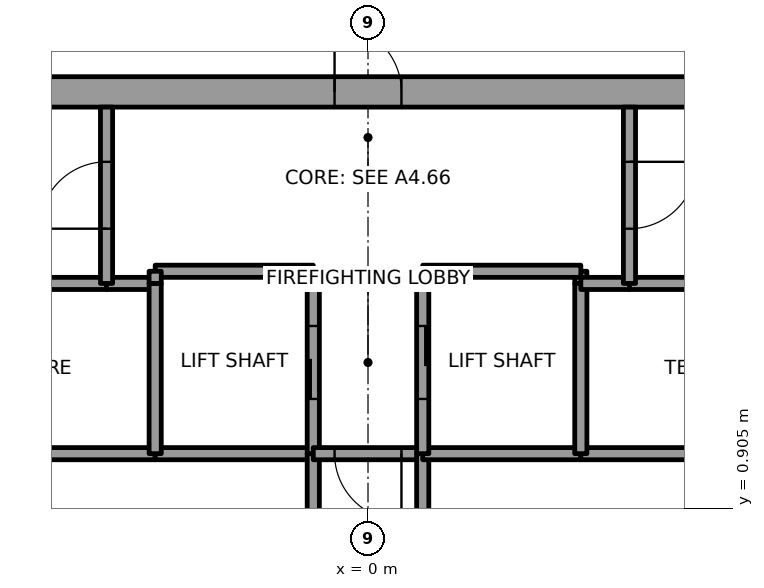
"""IFC4 building model, lengths in metres.
Left out: names, types, materials, properties, quantities, classifications, styles, units other than length and angle.
Written with IfcOpenShell. Run it as: python <this file> out.ifc"""

import sys

from ifc_helpers import new_model, si_unit, direction, frame, frame_2d, origin, place, context, subcontext, project, spatial, rectangle, extrude, element, fill, save


model = new_model("IFC4")
c1 = context("Model", 3, precision=1e-05, world=origin(), true_north=direction((0.0, 1.0)))
c2 = subcontext(c1, "Body", "Model", "MODEL_VIEW")
j1 = project(units=[si_unit("LENGTHUNIT", "METRE"), si_unit("PLANEANGLEUNIT", "RADIAN")], contexts=[c1])
p1 = place(None, origin())
s1 = spatial("IfcSite", under=j1, at=p1, CompositionType="ELEMENT")
p2 = place(p1, origin())
s2 = spatial("IfcBuilding", under=s1, at=p2, CompositionType="ELEMENT")
p3 = place(p2, frame((0.0, 0.0, 283.0)))
s3 = spatial("IfcBuildingStorey", under=s2, at=p3, CompositionType="ELEMENT", Elevation=283.0)
p4 = place(p3, frame((-11.0, 7.75, 0.0), z_axis=(0.0, 0.0, 1.0), x_axis=(1.0, 0.0, 0.0)))
e1 = element("IfcWall", 1, at=p4, inside=s3, PredefinedType="SHEAR", context=c2, shape_type="SweptSolid", body=[
    extrude(rectangle(XDim=22.0, YDim=0.5, at=frame_2d((11.0, 0.0))), origin(), (0.0, 0.0, 1.0), 4.0),
])
p5 = place(p4, frame((10.45, 0.0, 0.0)))
e2 = element("IfcOpeningElement", 2, at=p5, cuts=e1, PredefinedType="OPENING", context=c2, shape_type="SweptSolid", body=[
    extrude(rectangle(XDim=1.1, YDim=2.1, at=frame_2d((0.55, 1.05))), frame((0.0, 0.25, 0.0), z_axis=(0.0, -1.0, 0.0), x_axis=(1.0, 0.0, 0.0)), (0.0, 0.0, 1.0), 0.5),
])
p6 = place(p3, frame((-8.7, 1.8, 0.0), z_axis=(0.0, 0.0, 1.0), x_axis=(1.0, 0.0, 0.0)))
e3 = element("IfcWall", 3, at=p6, inside=s3, PredefinedType="SOLIDWALL", context=c2, shape_type="SweptSolid", body=[
    extrude(rectangle(XDim=5.2, YDim=0.2, at=frame_2d((2.6, 0.0))), origin(), (0.0, 0.0, 1.0), 3.85),
])
p7 = place(p6, frame((2.15, 0.0, 0.0)))
e4 = element("IfcOpeningElement", 4, at=p7, cuts=e3, PredefinedType="OPENING", context=c2, shape_type="SweptSolid", body=[
    extrude(rectangle(XDim=0.9, YDim=2.1, at=frame_2d((0.45, 1.05))), frame((0.0, 0.1, 0.0), z_axis=(0.0, -1.0, 0.0), x_axis=(1.0, 0.0, 0.0)), (0.0, 0.0, 1.0), 0.2),
])
p8 = place(p3, frame((-4.3, 4.6, 0.0), z_axis=(0.0, 0.0, 1.0), x_axis=(-1.0, 0.0, 0.0)))
e5 = element("IfcWall", 5, at=p8, inside=s3, PredefinedType="SOLIDWALL", context=c2, shape_type="SweptSolid", body=[
    extrude(rectangle(XDim=4.4, YDim=0.2, at=frame_2d((2.2, 0.0))), origin(), (0.0, 0.0, 1.0), 3.85),
])
p9 = place(p3, frame((-3.5, 4.6, 0.0), z_axis=(0.0, 0.0, 1.0), x_axis=(-1.0, 0.0, 0.0)))
e6 = element("IfcWall", 6, at=p9, inside=s3, PredefinedType="SOLIDWALL", context=c2, shape_type="SweptSolid", body=[
    extrude(rectangle(XDim=0.8, YDim=0.2, at=frame_2d((0.4, 0.0))), origin(), (0.0, 0.0, 1.0), 3.85),
])
p10 = place(p3, frame((-4.3, 4.6, 0.0), z_axis=(0.0, 0.0, 1.0), x_axis=(0.0, 1.0, 0.0)))
e7 = element("IfcWall", 7, at=p10, inside=s3, PredefinedType="SOLIDWALL", context=c2, shape_type="SweptSolid", body=[
    extrude(rectangle(XDim=2.9, YDim=0.2, at=frame_2d((1.45, 0.0))), origin(), (0.0, 0.0, 1.0), 3.85),
])
p11 = place(p10, frame((0.9, 0.0, 0.0)))
e8 = element("IfcOpeningElement", 8, at=p11, cuts=e7, PredefinedType="OPENING", context=c2, shape_type="SweptSolid", body=[
    extrude(rectangle(XDim=1.1, YDim=2.1, at=frame_2d((0.55, 1.05))), frame((0.0, 0.1, 0.0), z_axis=(0.0, -1.0, 0.0), x_axis=(1.0, 0.0, 0.0)), (0.0, 0.0, 1.0), 0.2),
])
p12 = place(p3, frame((-0.9, 1.8, 0.0), z_axis=(0.0, 0.0, 1.0), x_axis=(-1.0, 0.0, 0.0)))
e9 = element("IfcWall", 9, at=p12, inside=s3, PredefinedType="SOLIDWALL", context=c2, shape_type="SweptSolid", body=[
    extrude(rectangle(XDim=2.6, YDim=0.2, at=frame_2d((1.3, 0.0))), origin(), (0.0, 0.0, 1.0), 3.85),
])
p13 = place(p3, frame((-3.5, 1.8, 0.0), z_axis=(0.0, 0.0, 1.0), x_axis=(0.0, 1.0, 0.0)))
e10 = element("IfcWall", 10, at=p13, inside=s3, PredefinedType="SOLIDWALL", context=c2, shape_type="SweptSolid", body=[
    extrude(rectangle(XDim=2.8, YDim=0.2, at=frame_2d((1.4, 0.0))), origin(), (0.0, 0.0, 1.0), 3.85),
])
p14 = place(p3, frame((-0.9, 1.8, 0.0), z_axis=(0.0, 0.0, 1.0), x_axis=(0.0, 1.0, 0.0)))
e11 = element("IfcWall", 11, at=p14, inside=s3, PredefinedType="SOLIDWALL", context=c2, shape_type="SweptSolid", body=[
    extrude(rectangle(XDim=3.0, YDim=0.2, at=frame_2d((1.5, 0.0))), origin(), (0.0, 0.0, 1.0), 3.85),
])
p15 = place(p14, frame((0.9, 0.0, 0.0)))
e12 = element("IfcOpeningElement", 12, at=p15, cuts=e11, PredefinedType="OPENING", context=c2, shape_type="SweptSolid", body=[
    extrude(rectangle(XDim=1.2, YDim=2.1, at=frame_2d((0.6, 1.05))), frame((0.0, 0.1, 0.0), z_axis=(0.0, -1.0, 0.0), x_axis=(1.0, 0.0, 0.0)), (0.0, 0.0, 1.0), 0.2),
])
p16 = place(p3, frame((-0.9, 4.8, 0.0), z_axis=(0.0, 0.0, 1.0), x_axis=(-1.0, 0.0, 0.0)))
e13 = element("IfcWall", 13, at=p16, inside=s3, PredefinedType="SOLIDWALL", context=c2, shape_type="SweptSolid", body=[
    extrude(rectangle(XDim=2.6, YDim=0.2, at=frame_2d((1.3, 0.0))), origin(), (0.0, 0.0, 1.0), 3.85),
])
p17 = place(p3, frame((-3.5, 4.8, 0.0), z_axis=(0.0, 0.0, 1.0), x_axis=(0.0, -1.0, 0.0)))
e14 = element("IfcWall", 14, at=p17, inside=s3, PredefinedType="SOLIDWALL", context=c2, shape_type="SweptSolid", body=[
    extrude(rectangle(XDim=0.2, YDim=0.2, at=frame_2d((0.1, 0.0))), origin(), (0.0, 0.0, 1.0), 3.85),
])
p18 = place(p3, frame((-0.9, 1.8, 0.0), z_axis=(0.0, 0.0, 1.0), x_axis=(0.0, -1.0, 0.0)))
e15 = element("IfcWall", 15, at=p18, inside=s3, PredefinedType="SOLIDWALL", context=c2, shape_type="SweptSolid", body=[
    extrude(rectangle(XDim=3.6, YDim=0.2, at=frame_2d((1.8, 0.0))), origin(), (0.0, 0.0, 1.0), 3.85),
])
p19 = place(p18, frame((1.05, 0.0, 0.0)))
e16 = element("IfcOpeningElement", 16, at=p19, cuts=e15, PredefinedType="OPENING", context=c2, shape_type="SweptSolid", body=[
    extrude(rectangle(XDim=1.5, YDim=2.1, at=frame_2d((0.75, 1.05))), frame((0.0, 0.1, 0.0), z_axis=(0.0, -1.0, 0.0), x_axis=(1.0, 0.0, 0.0)), (0.0, 0.0, 1.0), 0.2),
])
p20 = place(p3, frame((0.9, 1.8, 0.0), z_axis=(0.0, 0.0, 1.0), x_axis=(-1.0, 0.0, 0.0)))
e17 = element("IfcWall", 17, at=p20, inside=s3, PredefinedType="SOLIDWALL", context=c2, shape_type="SweptSolid", body=[
    extrude(rectangle(XDim=1.8, YDim=0.2, at=frame_2d((0.9, 0.0))), origin(), (0.0, 0.0, 1.0), 3.85),
])
p21 = place(p20, frame((0.35, 0.0, 0.0)))
e18 = element("IfcOpeningElement", 18, at=p21, cuts=e17, PredefinedType="OPENING", context=c2, shape_type="SweptSolid", body=[
    extrude(rectangle(XDim=1.1, YDim=2.1, at=frame_2d((0.55, 1.05))), frame((0.0, 0.1, 0.0), z_axis=(0.0, -1.0, 0.0), x_axis=(1.0, 0.0, 0.0)), (0.0, 0.0, 1.0), 0.2),
])
p22 = place(p3, frame((0.9, -1.8, 0.0), z_axis=(0.0, 0.0, 1.0), x_axis=(0.0, 1.0, 0.0)))
e19 = element("IfcWall", 19, at=p22, inside=s3, PredefinedType="SOLIDWALL", context=c2, shape_type="SweptSolid", body=[
    extrude(rectangle(XDim=3.6, YDim=0.2, at=frame_2d((1.8, 0.0))), origin(), (0.0, 0.0, 1.0), 3.85),
])
p23 = place(p22, frame((1.05, 0.0, 0.0)))
e20 = element("IfcOpeningElement", 20, at=p23, cuts=e19, PredefinedType="OPENING", context=c2, shape_type="SweptSolid", body=[
    extrude(rectangle(XDim=1.5, YDim=2.1, at=frame_2d((0.75, 1.05))), frame((0.0, 0.1, 0.0), z_axis=(0.0, -1.0, 0.0), x_axis=(1.0, 0.0, 0.0)), (0.0, 0.0, 1.0), 0.2),
])
p24 = place(p3, frame((3.5, 1.8, 0.0), z_axis=(0.0, 0.0, 1.0), x_axis=(-1.0, 0.0, 0.0)))
e21 = element("IfcWall", 21, at=p24, inside=s3, PredefinedType="SOLIDWALL", context=c2, shape_type="SweptSolid", body=[
    extrude(rectangle(XDim=2.6, YDim=0.2, at=frame_2d((1.3, 0.0))), origin(), (0.0, 0.0, 1.0), 3.85),
])
p25 = place(p3, frame((3.5, 4.6, 0.0), z_axis=(0.0, 0.0, 1.0), x_axis=(0.0, 1.0, 0.0)))
e22 = element("IfcWall", 22, at=p25, inside=s3, PredefinedType="SOLIDWALL", context=c2, shape_type="SweptSolid", body=[
    extrude(rectangle(XDim=0.2, YDim=0.2, at=frame_2d((0.1, 0.0))), origin(), (0.0, 0.0, 1.0), 3.85),
])
p26 = place(p3, frame((3.5, 4.8, 0.0), z_axis=(0.0, 0.0, 1.0), x_axis=(-1.0, 0.0, 0.0)))
e23 = element("IfcWall", 23, at=p26, inside=s3, PredefinedType="SOLIDWALL", context=c2, shape_type="SweptSolid", body=[
    extrude(rectangle(XDim=2.6, YDim=0.2, at=frame_2d((1.3, 0.0))), origin(), (0.0, 0.0, 1.0), 3.85),
])
p27 = place(p3, frame((0.9, 4.8, 0.0), z_axis=(0.0, 0.0, 1.0), x_axis=(0.0, -1.0, 0.0)))
e24 = element("IfcWall", 24, at=p27, inside=s3, PredefinedType="SOLIDWALL", context=c2, shape_type="SweptSolid", body=[
    extrude(rectangle(XDim=3.0, YDim=0.2, at=frame_2d((1.5, 0.0))), origin(), (0.0, 0.0, 1.0), 3.85),
])
p28 = place(p27, frame((0.9, 0.0, 0.0)))
e25 = element("IfcOpeningElement", 25, at=p28, cuts=e24, PredefinedType="OPENING", context=c2, shape_type="SweptSolid", body=[
    extrude(rectangle(XDim=1.2, YDim=2.1, at=frame_2d((0.6, 1.05))), frame((0.0, 0.1, 0.0), z_axis=(0.0, -1.0, 0.0), x_axis=(1.0, 0.0, 0.0)), (0.0, 0.0, 1.0), 0.2),
])
p29 = place(p3, frame((3.5, 1.8, 0.0), z_axis=(0.0, 0.0, 1.0), x_axis=(1.0, 0.0, 0.0)))
e26 = element("IfcWall", 26, at=p29, inside=s3, PredefinedType="SOLIDWALL", context=c2, shape_type="SweptSolid", body=[
    extrude(rectangle(XDim=5.2, YDim=0.2, at=frame_2d((2.6, 0.0))), origin(), (0.0, 0.0, 1.0), 3.85),
])
p30 = place(p29, frame((2.15, 0.0, 0.0)))
e27 = element("IfcOpeningElement", 27, at=p30, cuts=e26, PredefinedType="OPENING", context=c2, shape_type="SweptSolid", body=[
    extrude(rectangle(XDim=0.9, YDim=2.1, at=frame_2d((0.45, 1.05))), frame((0.0, 0.1, 0.0), z_axis=(0.0, -1.0, 0.0), x_axis=(1.0, 0.0, 0.0)), (0.0, 0.0, 1.0), 0.2),
])
p31 = place(p3, frame((3.5, 4.6, 0.0), z_axis=(0.0, 0.0, 1.0), x_axis=(0.0, -1.0, 0.0)))
e28 = element("IfcWall", 28, at=p31, inside=s3, PredefinedType="SOLIDWALL", context=c2, shape_type="SweptSolid", body=[
    extrude(rectangle(XDim=2.8, YDim=0.2, at=frame_2d((1.4, 0.0))), origin(), (0.0, 0.0, 1.0), 3.85),
])
p32 = place(p3, frame((4.3, 4.6, 0.0), z_axis=(0.0, 0.0, 1.0), x_axis=(-1.0, 0.0, 0.0)))
e29 = element("IfcWall", 29, at=p32, inside=s3, PredefinedType="SOLIDWALL", context=c2, shape_type="SweptSolid", body=[
    extrude(rectangle(XDim=0.8, YDim=0.2, at=frame_2d((0.4, 0.0))), origin(), (0.0, 0.0, 1.0), 3.85),
])
p33 = place(p3, frame((8.7, 4.6, 0.0), z_axis=(0.0, 0.0, 1.0), x_axis=(-1.0, 0.0, 0.0)))
e30 = element("IfcWall", 30, at=p33, inside=s3, PredefinedType="SOLIDWALL", context=c2, shape_type="SweptSolid", body=[
    extrude(rectangle(XDim=4.4, YDim=0.2, at=frame_2d((2.2, 0.0))), origin(), (0.0, 0.0, 1.0), 3.85),
])
p34 = place(p3, frame((4.3, 7.5, 0.0), z_axis=(0.0, 0.0, 1.0), x_axis=(0.0, -1.0, 0.0)))
e31 = element("IfcWall", 31, at=p34, inside=s3, PredefinedType="SOLIDWALL", context=c2, shape_type="SweptSolid", body=[
    extrude(rectangle(XDim=2.9, YDim=0.2, at=frame_2d((1.45, 0.0))), origin(), (0.0, 0.0, 1.0), 3.85),
])
p35 = place(p34, frame((0.9, 0.0, 0.0)))
e32 = element("IfcOpeningElement", 32, at=p35, cuts=e31, PredefinedType="OPENING", context=c2, shape_type="SweptSolid", body=[
    extrude(rectangle(XDim=1.1, YDim=2.1, at=frame_2d((0.55, 1.05))), frame((0.0, 0.1, 0.0), z_axis=(0.0, -1.0, 0.0), x_axis=(1.0, 0.0, 0.0)), (0.0, 0.0, 1.0), 0.2),
])
p36 = place(p15, origin())
e33 = element("IfcDoor", 33, at=p36, inside=s3, OperationType="SLIDING_TO_LEFT", PredefinedType="DOOR", context=c2, shape_type="SweptSolid", body=[
    extrude(rectangle(XDim=1.2, YDim=2.1, at=frame_2d((0.6, 1.05))), frame((0.0, 0.025, 0.0), z_axis=(0.0, -1.0, 0.0), x_axis=(1.0, 0.0, 0.0)), (0.0, 0.0, 1.0), 0.05),
])
fill(e12, e33)
p37 = place(p28, origin())
e34 = element("IfcDoor", 34, at=p37, inside=s3, OperationType="SLIDING_TO_RIGHT", PredefinedType="DOOR", context=c2, shape_type="SweptSolid", body=[
    extrude(rectangle(XDim=1.2, YDim=2.1, at=frame_2d((0.6, 1.05))), frame((0.0, 0.025, 0.0), z_axis=(0.0, -1.0, 0.0), x_axis=(1.0, 0.0, 0.0)), (0.0, 0.0, 1.0), 0.05),
])
fill(e25, e34)
p38 = place(p21, origin())
e35 = element("IfcDoor", 35, at=p38, inside=s3, OperationType="SINGLE_SWING_LEFT", PredefinedType="DOOR", context=c2, shape_type="SweptSolid", body=[
    extrude(rectangle(XDim=1.1, YDim=2.1, at=frame_2d((0.55, 1.05))), frame((0.0, 0.025, 0.0), z_axis=(0.0, -1.0, 0.0), x_axis=(1.0, 0.0, 0.0)), (0.0, 0.0, 1.0), 0.05),
])
fill(e18, e35)
p39 = place(p11, origin())
e36 = element("IfcDoor", 36, at=p39, inside=s3, OperationType="SINGLE_SWING_RIGHT", PredefinedType="DOOR", context=c2, shape_type="SweptSolid", body=[
    extrude(rectangle(XDim=1.1, YDim=2.1, at=frame_2d((0.55, 1.05))), frame((0.0, 0.025, 0.0), z_axis=(0.0, -1.0, 0.0), x_axis=(1.0, 0.0, 0.0)), (0.0, 0.0, 1.0), 0.05),
])
fill(e8, e36)
p40 = place(p35, origin())
e37 = element("IfcDoor", 37, at=p40, inside=s3, OperationType="SINGLE_SWING_LEFT", PredefinedType="DOOR", context=c2, shape_type="SweptSolid", body=[
    extrude(rectangle(XDim=1.1, YDim=2.1, at=frame_2d((0.55, 1.05))), frame((0.0, 0.025, 0.0), z_axis=(0.0, -1.0, 0.0), x_axis=(1.0, 0.0, 0.0)), (0.0, 0.0, 1.0), 0.05),
])
fill(e32, e37)
p41 = place(p5, origin())
e38 = element("IfcDoor", 38, at=p41, inside=s3, OperationType="SINGLE_SWING_LEFT", PredefinedType="DOOR", context=c2, shape_type="SweptSolid", body=[
    extrude(rectangle(XDim=1.1, YDim=2.1, at=frame_2d((0.55, 1.05))), frame((0.0, 0.025, 0.0), z_axis=(0.0, -1.0, 0.0), x_axis=(1.0, 0.0, 0.0)), (0.0, 0.0, 1.0), 0.05),
])
fill(e2, e38)
save(model, sys.argv[1])
